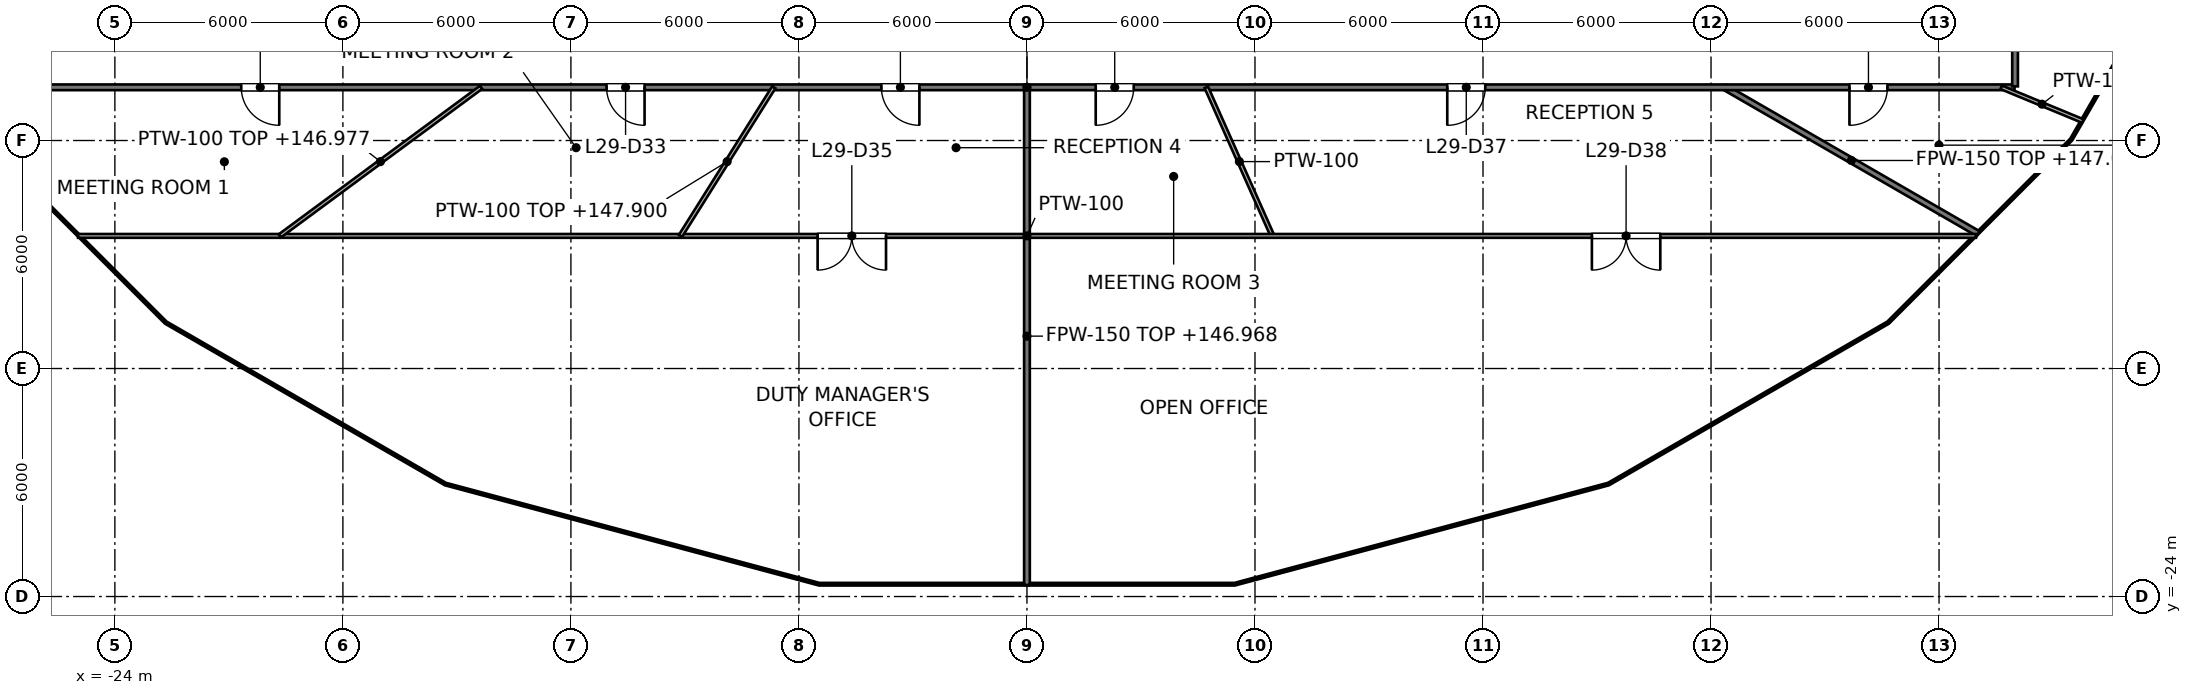
"""IFC4 building model, lengths in metres.
Left out: names, types, materials, properties, quantities, classifications, styles, units other than length and angle.
Written with IfcOpenShell. Run it as: python <this file> out.ifc"""

import sys

from ifc_helpers import new_model, si_unit, direction, frame, frame_2d, origin, place, context, subcontext, project, spatial, rectangle, extrude, element, fill, save


model = new_model("IFC4")
c1 = context("Model", 3, precision=1e-05, world=origin(), true_north=direction((0.0, 1.0)))
c2 = subcontext(c1, "Body", "Model", "MODEL_VIEW")
j1 = project(units=[si_unit("LENGTHUNIT", "METRE"), si_unit("PLANEANGLEUNIT", "RADIAN")], contexts=[c1])
p1 = place(None, origin())
s1 = spatial("IfcSite", under=j1, at=p1, CompositionType="ELEMENT")
p2 = place(p1, origin())
s2 = spatial("IfcBuilding", under=s1, at=p2, CompositionType="ELEMENT")
p3 = place(p2, frame((0.0, 0.0, 144.0)))
s3 = spatial("IfcBuildingStorey", under=s2, at=p3, CompositionType="ELEMENT", Elevation=144.0)
p4 = place(p3, frame((18.359, -10.6, 0.0), z_axis=(0.0, 0.0, 1.0), x_axis=(0.866036201792, -0.499981296836, 0.0)))
e1 = element("IfcWall", 1, at=p4, inside=s3, PredefinedType="PARTITIONING", context=c2, shape_type="SweptSolid", body=[
    extrude(rectangle(XDim=7.702, YDim=0.15, at=frame_2d((3.851, 0.0))), origin(), (0.0, 0.0, 1.0), 3.045),
])
p5 = place(p3, frame((-25.986, -10.6, 0.0), z_axis=(0.0, 0.0, 1.0), x_axis=(1.0, 0.0, 0.0)))
e2 = element("IfcWall", 2, at=p5, inside=s3, PredefinedType="PARTITIONING", context=c2, shape_type="SweptSolid", body=[
    extrude(rectangle(XDim=51.972, YDim=0.15, at=frame_2d((25.986, 0.0))), origin(), (0.0, 0.0, 1.0), 2.968),
])
p6 = place(p5, frame((47.628, 0.0, 0.0)))
e3 = element("IfcOpeningElement", 3, at=p6, cuts=e2, PredefinedType="OPENING", context=c2, shape_type="SweptSolid", body=[
    extrude(rectangle(XDim=1.0, YDim=2.1, at=frame_2d((0.5, 1.05))), frame((0.0, 0.075, 0.0), z_axis=(0.0, -1.0, 0.0), x_axis=(1.0, 0.0, 0.0)), (0.0, 0.0, 1.0), 0.15),
])
p7 = place(p5, frame((5.312, 0.0, 0.0)))
e4 = element("IfcOpeningElement", 4, at=p7, cuts=e2, PredefinedType="OPENING", context=c2, shape_type="SweptSolid", body=[
    extrude(rectangle(XDim=1.0, YDim=2.1, at=frame_2d((0.5, 1.05))), frame((0.0, 0.075, 0.0), z_axis=(0.0, -1.0, 0.0), x_axis=(1.0, 0.0, 0.0)), (0.0, 0.0, 1.0), 0.15),
])
p8 = place(p5, frame((14.924, 0.0, 0.0)))
e5 = element("IfcOpeningElement", 5, at=p8, cuts=e2, PredefinedType="OPENING", context=c2, shape_type="SweptSolid", body=[
    extrude(rectangle(XDim=1.0, YDim=2.1, at=frame_2d((0.5, 1.05))), frame((0.0, 0.075, 0.0), z_axis=(0.0, -1.0, 0.0), x_axis=(1.0, 0.0, 0.0)), (0.0, 0.0, 1.0), 0.15),
])
p9 = place(p5, frame((22.156, 0.0, 0.0)))
e6 = element("IfcOpeningElement", 6, at=p9, cuts=e2, PredefinedType="OPENING", context=c2, shape_type="SweptSolid", body=[
    extrude(rectangle(XDim=1.0, YDim=2.1, at=frame_2d((0.5, 1.05))), frame((0.0, 0.075, 0.0), z_axis=(0.0, -1.0, 0.0), x_axis=(1.0, 0.0, 0.0)), (0.0, 0.0, 1.0), 0.15),
])
p10 = place(p5, frame((27.795, 0.0, 0.0)))
e7 = element("IfcOpeningElement", 7, at=p10, cuts=e2, PredefinedType="OPENING", context=c2, shape_type="SweptSolid", body=[
    extrude(rectangle(XDim=1.0, YDim=2.1, at=frame_2d((0.5, 1.05))), frame((0.0, 0.075, 0.0), z_axis=(0.0, -1.0, 0.0), x_axis=(1.0, 0.0, 0.0)), (0.0, 0.0, 1.0), 0.15),
])
p11 = place(p5, frame((37.045, 0.0, 0.0)))
e8 = element("IfcOpeningElement", 8, at=p11, cuts=e2, PredefinedType="OPENING", context=c2, shape_type="SweptSolid", body=[
    extrude(rectangle(XDim=1.0, YDim=2.1, at=frame_2d((0.5, 1.05))), frame((0.0, 0.075, 0.0), z_axis=(0.0, -1.0, 0.0), x_axis=(1.0, 0.0, 0.0)), (0.0, 0.0, 1.0), 0.15),
])
p12 = place(p3, frame((26.0, -10.575, 0.0), z_axis=(0.0, 0.0, 1.0), x_axis=(0.0, 1.0, 0.0)))
e9 = element("IfcWall", 9, at=p12, inside=s3, PredefinedType="PARTITIONING", context=c2, shape_type="SweptSolid", body=[
    extrude(rectangle(XDim=2.775, YDim=0.15, at=frame_2d((1.387, 0.0))), origin(), (0.0, 0.0, 1.0), 2.977),
])
p13 = place(p3, frame((0.0, -23.696, 0.0), z_axis=(0.0, 0.0, 1.0), x_axis=(0.0, 1.0, 0.0)))
e10 = element("IfcWall", 10, at=p13, inside=s3, PredefinedType="PARTITIONING", context=c2, shape_type="SweptSolid", body=[
    extrude(rectangle(XDim=13.096, YDim=0.15, at=frame_2d((6.548, 0.0))), origin(), (0.0, 0.0, 1.0), 2.968),
])
p14 = place(p3, frame((4.719, -10.6, 0.0), z_axis=(0.0, 0.0, 1.0), x_axis=(0.406768186446, -0.913531412977, 0.0)))
e11 = element("IfcWall", 11, at=p14, inside=s3, PredefinedType="PARTITIONING", context=c2, shape_type="SweptSolid", body=[
    extrude(rectangle(XDim=4.28, YDim=0.1, at=frame_2d((2.14, 0.0))), origin(), (0.0, 0.0, 1.0), 2.968),
])
p15 = place(p3, frame((25.635, -10.6, 0.0), z_axis=(0.0, 0.0, 1.0), x_axis=(0.924087226733, -0.382181628796, 0.0)))
e12 = element("IfcWall", 12, at=p15, inside=s3, PredefinedType="PARTITIONING", context=c2, shape_type="SweptSolid", body=[
    extrude(rectangle(XDim=2.323, YDim=0.1, at=frame_2d((1.162, 0.0))), origin(), (0.0, 0.0, 1.0), 3.525),
])
p16 = place(p3, frame((-24.97, -14.51, 0.0), z_axis=(0.0, 0.0, 1.0), x_axis=(1.0, 0.0, 0.0)))
e13 = element("IfcWall", 13, at=p16, inside=s3, PredefinedType="PARTITIONING", context=c2, shape_type="SweptSolid", body=[
    extrude(rectangle(XDim=49.94, YDim=0.1, at=frame_2d((24.97, 0.0))), origin(), (0.0, 0.0, 1.0), 2.968),
])
p17 = place(p16, frame((19.461, 0.0, 0.0)))
e14 = element("IfcOpeningElement", 14, at=p17, cuts=e13, PredefinedType="OPENING", context=c2, shape_type="SweptSolid", body=[
    extrude(rectangle(XDim=1.8, YDim=2.1, at=frame_2d((0.9, 1.05))), frame((0.0, 0.05, 0.0), z_axis=(0.0, -1.0, 0.0), x_axis=(1.0, 0.0, 0.0)), (0.0, 0.0, 1.0), 0.1),
])
p18 = place(p16, frame((39.835, 0.0, 0.0)))
e15 = element("IfcOpeningElement", 15, at=p18, cuts=e13, PredefinedType="OPENING", context=c2, shape_type="SweptSolid", body=[
    extrude(rectangle(XDim=1.8, YDim=2.1, at=frame_2d((0.9, 1.05))), frame((0.0, 0.05, 0.0), z_axis=(0.0, -1.0, 0.0), x_axis=(1.0, 0.0, 0.0)), (0.0, 0.0, 1.0), 0.1),
])
p19 = place(p3, frame((-19.661, -14.51, 0.0), z_axis=(0.0, 0.0, 1.0), x_axis=(0.804603605329, 0.593812292136, 0.0)))
e16 = element("IfcWall", 16, at=p19, inside=s3, PredefinedType="PARTITIONING", context=c2, shape_type="SweptSolid", body=[
    extrude(rectangle(XDim=6.584, YDim=0.1, at=frame_2d((3.292, 0.0))), origin(), (0.0, 0.0, 1.0), 2.977),
])
p20 = place(p3, frame((-9.117, -14.51, 0.0), z_axis=(0.0, 0.0, 1.0), x_axis=(0.531922462086, 0.846793064643, 0.0)))
e17 = element("IfcWall", 17, at=p20, inside=s3, PredefinedType="PARTITIONING", context=c2, shape_type="SweptSolid", body=[
    extrude(rectangle(XDim=4.617, YDim=0.1, at=frame_2d((2.309, 0.0))), origin(), (0.0, 0.0, 1.0), 3.9),
])
p21 = place(p6, origin())
e18 = element("IfcDoor", 18, at=p21, inside=s3, OperationType="SINGLE_SWING_LEFT", PredefinedType="DOOR", context=c2, shape_type="SweptSolid", body=[
    extrude(rectangle(XDim=1.0, YDim=2.1, at=frame_2d((0.5, 1.05))), frame((0.0, 0.025, 0.0), z_axis=(0.0, -1.0, 0.0), x_axis=(1.0, 0.0, 0.0)), (0.0, 0.0, 1.0), 0.05),
])
fill(e3, e18)
p22 = place(p7, origin())
e19 = element("IfcDoor", 19, at=p22, inside=s3, OperationType="SINGLE_SWING_RIGHT", PredefinedType="DOOR", context=c2, shape_type="SweptSolid", body=[
    extrude(rectangle(XDim=1.0, YDim=2.1, at=frame_2d((0.5, 1.05))), frame((0.0, 0.025, 0.0), z_axis=(0.0, -1.0, 0.0), x_axis=(1.0, 0.0, 0.0)), (0.0, 0.0, 1.0), 0.05),
])
fill(e4, e19)
p23 = place(p8, origin())
e20 = element("IfcDoor", 20, at=p23, inside=s3, OperationType="SINGLE_SWING_RIGHT", PredefinedType="DOOR", context=c2, shape_type="SweptSolid", body=[
    extrude(rectangle(XDim=1.0, YDim=2.1, at=frame_2d((0.5, 1.05))), frame((0.0, 0.025, 0.0), z_axis=(0.0, -1.0, 0.0), x_axis=(1.0, 0.0, 0.0)), (0.0, 0.0, 1.0), 0.05),
])
fill(e5, e20)
p24 = place(p9, origin())
e21 = element("IfcDoor", 21, at=p24, inside=s3, OperationType="SINGLE_SWING_RIGHT", PredefinedType="DOOR", context=c2, shape_type="SweptSolid", body=[
    extrude(rectangle(XDim=1.0, YDim=2.1, at=frame_2d((0.5, 1.05))), frame((0.0, 0.025, 0.0), z_axis=(0.0, -1.0, 0.0), x_axis=(1.0, 0.0, 0.0)), (0.0, 0.0, 1.0), 0.05),
])
fill(e6, e21)
p25 = place(p17, origin())
e22 = element("IfcDoor", 22, at=p25, inside=s3, OperationType="DOUBLE_DOOR_SINGLE_SWING", PredefinedType="DOOR", context=c2, shape_type="SweptSolid", body=[
    extrude(rectangle(XDim=1.8, YDim=2.1, at=frame_2d((0.9, 1.05))), frame((0.0, 0.025, 0.0), z_axis=(0.0, -1.0, 0.0), x_axis=(1.0, 0.0, 0.0)), (0.0, 0.0, 1.0), 0.05),
])
fill(e14, e22)
p26 = place(p10, origin())
e23 = element("IfcDoor", 23, at=p26, inside=s3, OperationType="SINGLE_SWING_LEFT", PredefinedType="DOOR", context=c2, shape_type="SweptSolid", body=[
    extrude(rectangle(XDim=1.0, YDim=2.1, at=frame_2d((0.5, 1.05))), frame((0.0, 0.025, 0.0), z_axis=(0.0, -1.0, 0.0), x_axis=(1.0, 0.0, 0.0)), (0.0, 0.0, 1.0), 0.05),
])
fill(e7, e23)
p27 = place(p11, origin())
e24 = element("IfcDoor", 24, at=p27, inside=s3, OperationType="SINGLE_SWING_LEFT", PredefinedType="DOOR", context=c2, shape_type="SweptSolid", body=[
    extrude(rectangle(XDim=1.0, YDim=2.1, at=frame_2d((0.5, 1.05))), frame((0.0, 0.025, 0.0), z_axis=(0.0, -1.0, 0.0), x_axis=(1.0, 0.0, 0.0)), (0.0, 0.0, 1.0), 0.05),
])
fill(e8, e24)
p28 = place(p18, origin())
e25 = element("IfcDoor", 25, at=p28, inside=s3, OperationType="DOUBLE_DOOR_SINGLE_SWING", PredefinedType="DOOR", context=c2, shape_type="SweptSolid", body=[
    extrude(rectangle(XDim=1.8, YDim=2.1, at=frame_2d((0.9, 1.05))), frame((0.0, 0.025, 0.0), z_axis=(0.0, -1.0, 0.0), x_axis=(1.0, 0.0, 0.0)), (0.0, 0.0, 1.0), 0.05),
])
fill(e15, e25)
save(model, sys.argv[1])
